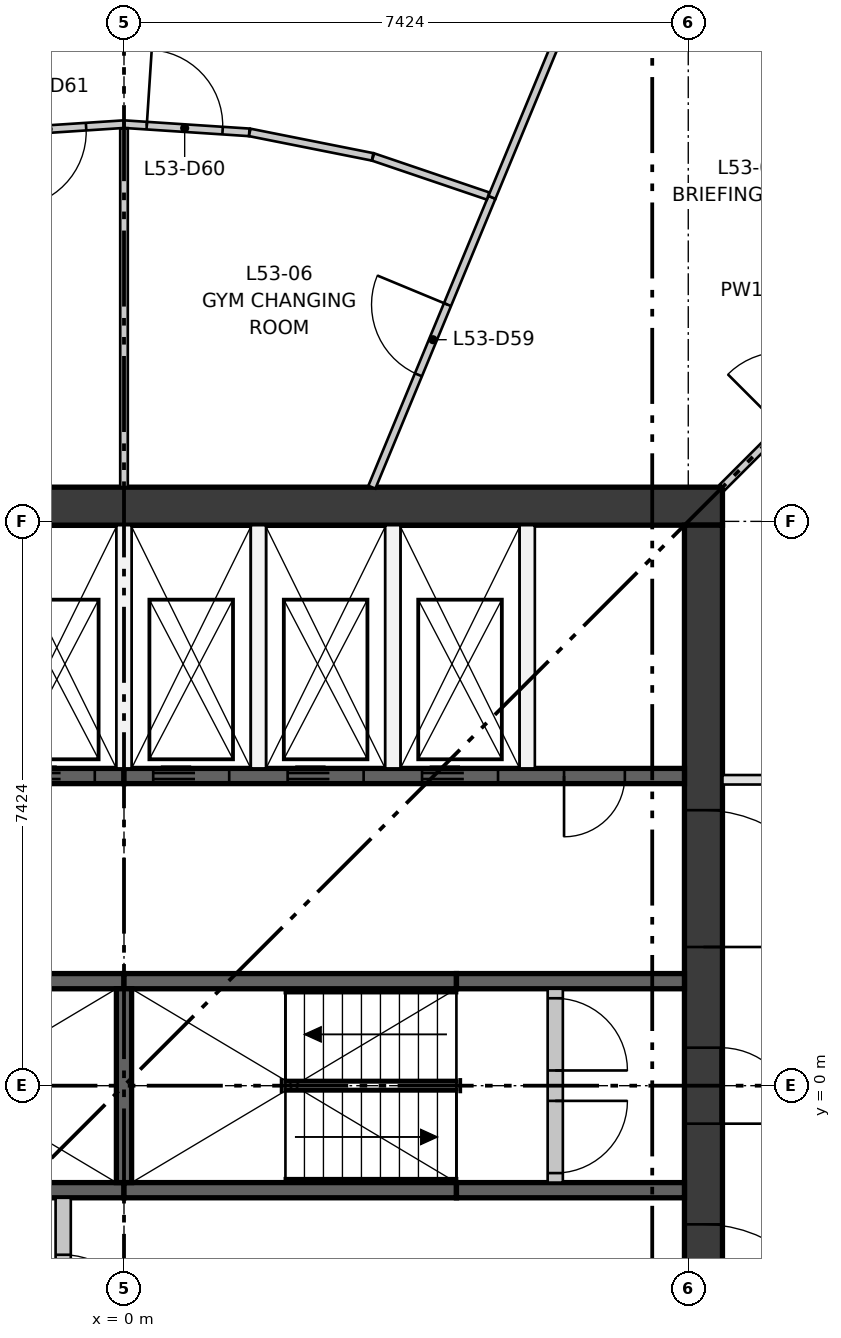
"""IFC4 building model, lengths in metres.
Left out: names, types, materials, properties, quantities, classifications, styles, units other than length and angle.
Written with IfcOpenShell. Run it as: python <this file> out.ifc"""

import sys

from ifc_helpers import new_model, si_unit, direction, frame, frame_2d, origin, place, context, subcontext, project, spatial, rectangle, extrude, element, fill, save


model = new_model("IFC4")
c1 = context("Model", 3, precision=1e-05, world=origin(), true_north=direction((0.0, 1.0)))
c2 = subcontext(c1, "Body", "Model", "MODEL_VIEW")
j1 = project(units=[si_unit("LENGTHUNIT", "METRE"), si_unit("PLANEANGLEUNIT", "RADIAN")], contexts=[c1])
p1 = place(None, origin())
s1 = spatial("IfcSite", under=j1, at=p1, CompositionType="ELEMENT")
p2 = place(p1, origin())
s2 = spatial("IfcBuilding", under=s1, at=p2, CompositionType="ELEMENT")
p3 = place(p2, frame((0.0, 0.0, 197.7)))
s3 = spatial("IfcBuildingStorey", under=s2, at=p3, CompositionType="ELEMENT", Elevation=197.7)
p4 = place(p3, frame((-7.874, 7.624, 0.0), z_axis=(0.0, 0.0, 1.0), x_axis=(1.0, 0.0, 0.0)))
e1 = element("IfcWall", 1, at=p4, inside=s3, PredefinedType="SHEAR", context=c2, shape_type="SweptSolid", body=[
    extrude(rectangle(XDim=15.748, YDim=0.5, at=frame_2d((7.874, 0.0))), origin(), (0.0, 0.0, 1.0), 3.35),
])
p5 = place(p3, frame((7.624, -7.374, 0.0), z_axis=(0.0, 0.0, 1.0), x_axis=(0.0, 1.0, 0.0)))
e2 = element("IfcWall", 2, at=p5, inside=s3, PredefinedType="SHEAR", context=c2, shape_type="SweptSolid", body=[
    extrude(rectangle(XDim=14.748, YDim=0.5, at=frame_2d((7.374, 0.0))), origin(), (0.0, 0.0, 1.0), 3.35),
])
p6 = place(p5, frame((6.874, 0.0, 0.0)))
e3 = element("IfcOpeningElement", 3, at=p6, cuts=e2, PredefinedType="OPENING", context=c2, shape_type="SweptSolid", body=[
    extrude(rectangle(XDim=1.0, YDim=2.1, at=frame_2d((0.5, 1.05))), frame((0.0, 0.26, 0.0), z_axis=(0.0, -1.0, 0.0), x_axis=(1.0, 0.0, 0.0)), (0.0, 0.0, 1.0), 0.52),
])
p7 = place(p5, frame((3.75, 0.0, 0.0)))
e4 = element("IfcOpeningElement", 4, at=p7, cuts=e2, PredefinedType="OPENING", context=c2, shape_type="SweptSolid", body=[
    extrude(rectangle(XDim=1.8, YDim=2.1, at=frame_2d((0.9, 1.05))), frame((0.0, 0.26, 0.0), z_axis=(0.0, -1.0, 0.0), x_axis=(1.0, 0.0, 0.0)), (0.0, 0.0, 1.0), 0.52),
])
p8 = place(p5, frame((9.198, 0.0, 0.0)))
e5 = element("IfcOpeningElement", 5, at=p8, cuts=e2, PredefinedType="OPENING", context=c2, shape_type="SweptSolid", body=[
    extrude(rectangle(XDim=1.8, YDim=2.1, at=frame_2d((0.9, 1.05))), frame((0.0, 0.26, 0.0), z_axis=(0.0, -1.0, 0.0), x_axis=(1.0, 0.0, 0.0)), (0.0, 0.0, 1.0), 0.52),
])
p9 = place(p3, frame((-7.374, 4.074, 0.0), z_axis=(0.0, 0.0, 1.0), x_axis=(1.0, 0.0, 0.0)))
e6 = element("IfcWall", 6, at=p9, inside=s3, PredefinedType="SHEAR", context=c2, shape_type="SweptSolid", body=[
    extrude(rectangle(XDim=7.374, YDim=0.2, at=frame_2d((3.687, 0.0))), origin(), (0.0, 0.0, 1.0), 3.0),
])
p10 = place(p9, frame((0.684, 0.0, 0.0)))
e7 = element("IfcOpeningElement", 7, at=p10, cuts=e6, PredefinedType="OPENING", context=c2, shape_type="SweptSolid", body=[
    extrude(rectangle(XDim=1.0, YDim=2.1, at=frame_2d((0.5, 1.05))), frame((0.0, 0.11, 0.0), z_axis=(0.0, -1.0, 0.0), x_axis=(1.0, 0.0, 0.0)), (0.0, 0.0, 1.0), 0.22),
])
p11 = place(p9, frame((2.453, 0.0, 0.0)))
e8 = element("IfcOpeningElement", 8, at=p11, cuts=e6, PredefinedType="OPENING", context=c2, shape_type="SweptSolid", body=[
    extrude(rectangle(XDim=1.0, YDim=2.1, at=frame_2d((0.5, 1.05))), frame((0.0, 0.11, 0.0), z_axis=(0.0, -1.0, 0.0), x_axis=(1.0, 0.0, 0.0)), (0.0, 0.0, 1.0), 0.22),
])
p12 = place(p9, frame((4.221, 0.0, 0.0)))
e9 = element("IfcOpeningElement", 9, at=p12, cuts=e6, PredefinedType="OPENING", context=c2, shape_type="SweptSolid", body=[
    extrude(rectangle(XDim=1.0, YDim=2.1, at=frame_2d((0.5, 1.05))), frame((0.0, 0.11, 0.0), z_axis=(0.0, -1.0, 0.0), x_axis=(1.0, 0.0, 0.0)), (0.0, 0.0, 1.0), 0.22),
])
p13 = place(p9, frame((5.99, 0.0, 0.0)))
e10 = element("IfcOpeningElement", 10, at=p13, cuts=e6, PredefinedType="OPENING", context=c2, shape_type="SweptSolid", body=[
    extrude(rectangle(XDim=1.0, YDim=2.1, at=frame_2d((0.5, 1.05))), frame((0.0, 0.11, 0.0), z_axis=(0.0, -1.0, 0.0), x_axis=(1.0, 0.0, 0.0)), (0.0, 0.0, 1.0), 0.22),
])
p14 = place(p3, frame((0.0, 4.074, 0.0), z_axis=(0.0, 0.0, 1.0), x_axis=(1.0, 0.0, 0.0)))
e11 = element("IfcWall", 11, at=p14, inside=s3, PredefinedType="SHEAR", context=c2, shape_type="SweptSolid", body=[
    extrude(rectangle(XDim=7.374, YDim=0.2, at=frame_2d((3.687, 0.0))), origin(), (0.0, 0.0, 1.0), 3.0),
])
p15 = place(p14, frame((0.384, 0.0, 0.0)))
e12 = element("IfcOpeningElement", 12, at=p15, cuts=e11, PredefinedType="OPENING", context=c2, shape_type="SweptSolid", body=[
    extrude(rectangle(XDim=1.0, YDim=2.1, at=frame_2d((0.5, 1.05))), frame((0.0, 0.11, 0.0), z_axis=(0.0, -1.0, 0.0), x_axis=(1.0, 0.0, 0.0)), (0.0, 0.0, 1.0), 0.22),
])
p16 = place(p14, frame((2.153, 0.0, 0.0)))
e13 = element("IfcOpeningElement", 13, at=p16, cuts=e11, PredefinedType="OPENING", context=c2, shape_type="SweptSolid", body=[
    extrude(rectangle(XDim=1.0, YDim=2.1, at=frame_2d((0.5, 1.05))), frame((0.0, 0.11, 0.0), z_axis=(0.0, -1.0, 0.0), x_axis=(1.0, 0.0, 0.0)), (0.0, 0.0, 1.0), 0.22),
])
p17 = place(p14, frame((3.921, 0.0, 0.0)))
e14 = element("IfcOpeningElement", 14, at=p17, cuts=e11, PredefinedType="OPENING", context=c2, shape_type="SweptSolid", body=[
    extrude(rectangle(XDim=1.0, YDim=2.1, at=frame_2d((0.5, 1.05))), frame((0.0, 0.11, 0.0), z_axis=(0.0, -1.0, 0.0), x_axis=(1.0, 0.0, 0.0)), (0.0, 0.0, 1.0), 0.22),
])
p18 = place(p14, frame((5.79, 0.0, 0.0)))
e15 = element("IfcOpeningElement", 15, at=p18, cuts=e11, PredefinedType="OPENING", context=c2, shape_type="SweptSolid", body=[
    extrude(rectangle(XDim=0.8, YDim=2.1, at=frame_2d((0.4, 1.05))), frame((0.0, 0.11, 0.0), z_axis=(0.0, -1.0, 0.0), x_axis=(1.0, 0.0, 0.0)), (0.0, 0.0, 1.0), 0.22),
])
for number, where, z_axis, x_axis in (
    (16, (-4.374, -1.375, 0.0), (0.0, 0.0, 1.0), (1.0, 0.0, 0.0)),
    (17, (0.0, -1.375, 0.0), (0.0, 0.0, 1.0), (1.0, 0.0, 0.0)),
):
    element("IfcWall", number, at=place(p3, frame(where, z_axis=z_axis, x_axis=x_axis)), inside=s3, PredefinedType="SHEAR", context=c2, shape_type="SweptSolid", body=[
        extrude(rectangle(XDim=4.374, YDim=0.2, at=frame_2d((2.187, 0.0))), origin(), (0.0, 0.0, 1.0), 3.0),
    ])
p19 = place(p3, frame((4.374, -1.375, 0.0), z_axis=(0.0, 0.0, 1.0), x_axis=(1.0, 0.0, 0.0)))
e18 = element("IfcWall", 18, at=p19, inside=s3, PredefinedType="SHEAR", context=c2, shape_type="SweptSolid", body=[
    extrude(rectangle(XDim=3.0, YDim=0.2, at=frame_2d((1.5, 0.0))), origin(), (0.0, 0.0, 1.0), 3.0),
])
for number, where, z_axis, x_axis in (
    (19, (-4.374, 1.375, 0.0), (0.0, 0.0, 1.0), (1.0, 0.0, 0.0)),
    (20, (0.0, 1.375, 0.0), (0.0, 0.0, 1.0), (1.0, 0.0, 0.0)),
):
    element("IfcWall", number, at=place(p3, frame(where, z_axis=z_axis, x_axis=x_axis)), inside=s3, PredefinedType="SHEAR", context=c2, shape_type="SweptSolid", body=[
        extrude(rectangle(XDim=4.374, YDim=0.2, at=frame_2d((2.187, 0.0))), origin(), (0.0, 0.0, 1.0), 3.0),
    ])
p20 = place(p3, frame((4.374, 1.375, 0.0), z_axis=(0.0, 0.0, 1.0), x_axis=(1.0, 0.0, 0.0)))
e21 = element("IfcWall", 21, at=p20, inside=s3, PredefinedType="SHEAR", context=c2, shape_type="SweptSolid", body=[
    extrude(rectangle(XDim=3.0, YDim=0.2, at=frame_2d((1.5, 0.0))), origin(), (0.0, 0.0, 1.0), 3.0),
])
p21 = place(p3, frame((0.0, -1.275, 0.0), z_axis=(0.0, 0.0, 1.0), x_axis=(0.0, 1.0, 0.0)))
e22 = element("IfcWall", 22, at=p21, inside=s3, PredefinedType="SHEAR", context=c2, shape_type="SweptSolid", body=[
    extrude(rectangle(XDim=2.55, YDim=0.2, at=frame_2d((1.275, 0.0))), origin(), (0.0, 0.0, 1.0), 3.0),
])
p22 = place(p3, frame((-0.8, -3.974, 0.0), z_axis=(0.0, 0.0, 1.0), x_axis=(0.0, 1.0, 0.0)))
e23 = element("IfcWall", 23, at=p22, inside=s3, PredefinedType="PARTITIONING", context=c2, shape_type="SweptSolid", body=[
    extrude(rectangle(XDim=2.499, YDim=0.2, at=frame_2d((1.25, 0.0))), origin(), (0.0, 0.0, 1.0), 3.0),
])
p23 = place(p22, frame((0.75, 0.0, 0.0)))
e24 = element("IfcOpeningElement", 24, at=p23, cuts=e23, PredefinedType="OPENING", context=c2, shape_type="SweptSolid", body=[
    extrude(rectangle(XDim=1.0, YDim=2.1, at=frame_2d((0.5, 1.05))), frame((0.0, 0.11, 0.0), z_axis=(0.0, -1.0, 0.0), x_axis=(1.0, 0.0, 0.0)), (0.0, 0.0, 1.0), 0.22),
])
for number, where, z_axis, x_axis in (
    (25, (0.0, 4.174, 0.0), (0.0, 0.0, 1.0), (0.0, 1.0, 0.0)),
    (26, (1.769, 4.174, 0.0), (0.0, 0.0, 1.0), (0.0, 1.0, 0.0)),
    (27, (3.537, 4.174, 0.0), (0.0, 0.0, 1.0), (0.0, 1.0, 0.0)),
    (28, (5.305, 4.174, 0.0), (0.0, 0.0, 1.0), (0.0, 1.0, 0.0)),
):
    element("IfcWall", number, at=place(p3, frame(where, z_axis=z_axis, x_axis=x_axis)), inside=s3, PredefinedType="PARTITIONING", context=c2, shape_type="SweptSolid", body=[
        extrude(rectangle(XDim=3.2, YDim=0.2, at=frame_2d((1.6, 0.0))), origin(), (0.0, 0.0, 1.0), 3.0),
    ])
p24 = place(p3, frame((5.674, -1.275, 0.0), z_axis=(0.0, 0.0, 1.0), x_axis=(0.0, 1.0, 0.0)))
e29 = element("IfcWall", 29, at=p24, inside=s3, PredefinedType="PARTITIONING", context=c2, shape_type="SweptSolid", body=[
    extrude(rectangle(XDim=2.55, YDim=0.2, at=frame_2d((1.275, 0.0))), origin(), (0.0, 0.0, 1.0), 3.0),
])
p25 = place(p24, frame((0.125, 0.0, 0.0)))
e30 = element("IfcOpeningElement", 30, at=p25, cuts=e29, PredefinedType="OPENING", context=c2, shape_type="SweptSolid", body=[
    extrude(rectangle(XDim=0.95, YDim=2.1, at=frame_2d((0.475, 1.05))), frame((0.0, 0.11, 0.0), z_axis=(0.0, -1.0, 0.0), x_axis=(1.0, 0.0, 0.0)), (0.0, 0.0, 1.0), 0.22),
])
p26 = place(p24, frame((1.475, 0.0, 0.0)))
e31 = element("IfcOpeningElement", 31, at=p26, cuts=e29, PredefinedType="OPENING", context=c2, shape_type="SweptSolid", body=[
    extrude(rectangle(XDim=0.95, YDim=2.1, at=frame_2d((0.475, 1.05))), frame((0.0, 0.11, 0.0), z_axis=(0.0, -1.0, 0.0), x_axis=(1.0, 0.0, 0.0)), (0.0, 0.0, 1.0), 0.22),
])
p27 = place(p3, frame((7.874, 4.024, 0.0), z_axis=(0.0, 0.0, 1.0), x_axis=(1.0, 0.0, 0.0)))
e32 = element("IfcWall", 32, at=p27, inside=s3, PredefinedType="PARTITIONING", context=c2, shape_type="SweptSolid", body=[
    extrude(rectangle(XDim=4.53, YDim=0.125, at=frame_2d((2.265, 0.0))), origin(), (0.0, 0.0, 1.0), 3.0),
])
p28 = place(p27, frame((1.8, 0.0, 0.0)))
e33 = element("IfcOpeningElement", 33, at=p28, cuts=e32, PredefinedType="OPENING", context=c2, shape_type="SweptSolid", body=[
    extrude(rectangle(XDim=1.0, YDim=2.1, at=frame_2d((0.5, 1.05))), frame((0.0, 0.073, 0.0), z_axis=(0.0, -1.0, 0.0), x_axis=(1.0, 0.0, 0.0)), (0.0, 0.0, 1.0), 0.145),
])
p29 = place(p3, frame((7.874, 7.874, 0.0), z_axis=(0.0, 0.0, 1.0), x_axis=(0.707106781187, 0.707106781187, 0.0)))
e34 = element("IfcWall", 34, at=p29, inside=s3, PredefinedType="PARTITIONING", context=c2, shape_type="SweptSolid", body=[
    extrude(rectangle(XDim=5.084, YDim=0.1, at=frame_2d((2.542, 0.0))), origin(), (0.0, 0.0, 1.0), 3.0),
])
p30 = place(p29, frame((1.1, 0.0, 0.0)))
e35 = element("IfcOpeningElement", 35, at=p30, cuts=e34, PredefinedType="OPENING", context=c2, shape_type="SweptSolid", body=[
    extrude(rectangle(XDim=1.0, YDim=2.1, at=frame_2d((0.5, 1.05))), frame((0.0, 0.06, 0.0), z_axis=(0.0, -1.0, 0.0), x_axis=(1.0, 0.0, 0.0)), (0.0, 0.0, 1.0), 0.12),
])
p31 = place(p3, frame((3.261, 7.874, 0.0), z_axis=(0.0, 0.0, 1.0), x_axis=(0.382673969281, 0.923883452192, 0.0)))
e36 = element("IfcWall", 36, at=p31, inside=s3, PredefinedType="PARTITIONING", context=c2, shape_type="SweptSolid", body=[
    extrude(rectangle(XDim=4.127, YDim=0.1, at=frame_2d((2.063, 0.0))), origin(), (0.0, 0.0, 1.0), 3.0),
])
p32 = place(p31, frame((1.6, 0.0, 0.0)))
e37 = element("IfcOpeningElement", 37, at=p32, cuts=e36, PredefinedType="OPENING", context=c2, shape_type="SweptSolid", body=[
    extrude(rectangle(XDim=1.0, YDim=2.1, at=frame_2d((0.5, 1.05))), frame((0.0, 0.06, 0.0), z_axis=(0.0, -1.0, 0.0), x_axis=(1.0, 0.0, 0.0)), (0.0, 0.0, 1.0), 0.12),
])
p33 = place(p3, frame((4.841, 11.687, 0.0), z_axis=(0.0, 0.0, 1.0), x_axis=(0.382681959822, 0.923880142457, 0.0)))
e38 = element("IfcWall", 38, at=p33, inside=s3, PredefinedType="PARTITIONING", context=c2, shape_type="SweptSolid", body=[
    extrude(rectangle(XDim=3.57, YDim=0.1, at=frame_2d((1.785, 0.0))), origin(), (0.0, 0.0, 1.0), 3.0),
])
p34 = place(p3, frame((0.0, 12.65, 0.0), z_axis=(0.0, 0.0, 1.0), x_axis=(0.997862957787, -0.065341544791, 0.0)))
e39 = element("IfcWall", 39, at=p34, inside=s3, PredefinedType="PARTITIONING", context=c2, shape_type="SweptSolid", body=[
    extrude(rectangle(XDim=1.651, YDim=0.1, at=frame_2d((0.826, 0.0))), origin(), (0.0, 0.0, 1.0), 3.0),
])
p35 = place(p34, frame((0.3, 0.0, 0.0)))
e40 = element("IfcOpeningElement", 40, at=p35, cuts=e39, PredefinedType="OPENING", context=c2, shape_type="SweptSolid", body=[
    extrude(rectangle(XDim=1.0, YDim=2.1, at=frame_2d((0.5, 1.05))), frame((0.0, 0.06, 0.0), z_axis=(0.0, -1.0, 0.0), x_axis=(1.0, 0.0, 0.0)), (0.0, 0.0, 1.0), 0.12),
])
p36 = place(p3, frame((1.654, 12.541, 0.0), z_axis=(0.0, 0.0, 1.0), x_axis=(0.98076253728, -0.195204624605, 0.0)))
e41 = element("IfcWall", 41, at=p36, inside=s3, PredefinedType="PARTITIONING", context=c2, shape_type="SweptSolid", body=[
    extrude(rectangle(XDim=1.648, YDim=0.1, at=frame_2d((0.824, 0.0))), origin(), (0.0, 0.0, 1.0), 3.0),
])
p37 = place(p3, frame((3.277, 12.218, 0.0), z_axis=(0.0, 0.0, 1.0), x_axis=(0.946927222845, -0.321448027891, 0.0)))
e42 = element("IfcWall", 42, at=p37, inside=s3, PredefinedType="PARTITIONING", context=c2, shape_type="SweptSolid", body=[
    extrude(rectangle(XDim=1.598, YDim=0.1, at=frame_2d((0.799, 0.0))), origin(), (0.0, 0.0, 1.0), 3.0),
])
p38 = place(p3, frame((0.0, 7.874, 0.0), z_axis=(0.0, 0.0, 1.0), x_axis=(0.0, 1.0, 0.0)))
e43 = element("IfcWall", 43, at=p38, inside=s3, PredefinedType="PARTITIONING", context=c2, shape_type="SweptSolid", body=[
    extrude(rectangle(XDim=4.723, YDim=0.1, at=frame_2d((2.361, 0.0))), origin(), (0.0, 0.0, 1.0), 3.0),
])
p39 = place(p3, frame((0.0, 12.65, 0.0), z_axis=(0.0, 0.0, 1.0), x_axis=(-0.997862957787, -0.065341544791, 0.0)))
e44 = element("IfcWall", 44, at=p39, inside=s3, PredefinedType="PARTITIONING", context=c2, shape_type="SweptSolid", body=[
    extrude(rectangle(XDim=1.651, YDim=0.1, at=frame_2d((0.826, 0.0))), origin(), (0.0, 0.0, 1.0), 3.0),
])
p40 = place(p39, frame((0.5, 0.0, 0.0)))
e45 = element("IfcOpeningElement", 45, at=p40, cuts=e44, PredefinedType="OPENING", context=c2, shape_type="SweptSolid", body=[
    extrude(rectangle(XDim=1.0, YDim=2.1, at=frame_2d((0.5, 1.05))), frame((0.0, 0.06, 0.0), z_axis=(0.0, -1.0, 0.0), x_axis=(1.0, 0.0, 0.0)), (0.0, 0.0, 1.0), 0.12),
])
p41 = place(p13, frame((1.0, 0.0, 0.0), z_axis=(0.0, 0.0, 1.0), x_axis=(-1.0, 0.0, 0.0)))
e46 = element("IfcDoor", 46, at=p41, inside=s3, OperationType="DOUBLE_DOOR_SLIDING", PredefinedType="DOOR", context=c2, shape_type="SweptSolid", body=[
    extrude(rectangle(XDim=1.0, YDim=2.1, at=frame_2d((0.5, 1.05))), frame((0.0, 0.025, 0.0), z_axis=(0.0, -1.0, 0.0), x_axis=(1.0, 0.0, 0.0)), (0.0, 0.0, 1.0), 0.05),
])
fill(e10, e46)
p42 = place(p15, frame((1.0, 0.0, 0.0), z_axis=(0.0, 0.0, 1.0), x_axis=(-1.0, 0.0, 0.0)))
e47 = element("IfcDoor", 47, at=p42, inside=s3, OperationType="DOUBLE_DOOR_SLIDING", PredefinedType="DOOR", context=c2, shape_type="SweptSolid", body=[
    extrude(rectangle(XDim=1.0, YDim=2.1, at=frame_2d((0.5, 1.05))), frame((0.0, 0.025, 0.0), z_axis=(0.0, -1.0, 0.0), x_axis=(1.0, 0.0, 0.0)), (0.0, 0.0, 1.0), 0.05),
])
fill(e12, e47)
p43 = place(p16, frame((1.0, 0.0, 0.0), z_axis=(0.0, 0.0, 1.0), x_axis=(-1.0, 0.0, 0.0)))
e48 = element("IfcDoor", 48, at=p43, inside=s3, OperationType="DOUBLE_DOOR_SLIDING", PredefinedType="DOOR", context=c2, shape_type="SweptSolid", body=[
    extrude(rectangle(XDim=1.0, YDim=2.1, at=frame_2d((0.5, 1.05))), frame((0.0, 0.025, 0.0), z_axis=(0.0, -1.0, 0.0), x_axis=(1.0, 0.0, 0.0)), (0.0, 0.0, 1.0), 0.05),
])
fill(e13, e48)
p44 = place(p17, frame((1.0, 0.0, 0.0), z_axis=(0.0, 0.0, 1.0), x_axis=(-1.0, 0.0, 0.0)))
e49 = element("IfcDoor", 49, at=p44, inside=s3, OperationType="DOUBLE_DOOR_SLIDING", PredefinedType="DOOR", context=c2, shape_type="SweptSolid", body=[
    extrude(rectangle(XDim=1.0, YDim=2.1, at=frame_2d((0.5, 1.05))), frame((0.0, 0.025, 0.0), z_axis=(0.0, -1.0, 0.0), x_axis=(1.0, 0.0, 0.0)), (0.0, 0.0, 1.0), 0.05),
])
fill(e14, e49)
p45 = place(p25, frame((0.95, 0.0, 0.0), z_axis=(0.0, 0.0, 1.0), x_axis=(-1.0, 0.0, 0.0)))
e50 = element("IfcDoor", 50, at=p45, inside=s3, OperationType="SINGLE_SWING_RIGHT", PredefinedType="DOOR", context=c2, shape_type="SweptSolid", body=[
    extrude(rectangle(XDim=0.95, YDim=2.1, at=frame_2d((0.475, 1.05))), frame((0.0, 0.025, 0.0), z_axis=(0.0, -1.0, 0.0), x_axis=(1.0, 0.0, 0.0)), (0.0, 0.0, 1.0), 0.05),
])
fill(e30, e50)
p46 = place(p26, frame((0.95, 0.0, 0.0), z_axis=(0.0, 0.0, 1.0), x_axis=(-1.0, 0.0, 0.0)))
e51 = element("IfcDoor", 51, at=p46, inside=s3, OperationType="SINGLE_SWING_LEFT", PredefinedType="DOOR", context=c2, shape_type="SweptSolid", body=[
    extrude(rectangle(XDim=0.95, YDim=2.1, at=frame_2d((0.475, 1.05))), frame((0.0, 0.025, 0.0), z_axis=(0.0, -1.0, 0.0), x_axis=(1.0, 0.0, 0.0)), (0.0, 0.0, 1.0), 0.05),
])
fill(e31, e51)
p47 = place(p23, frame((1.0, 0.0, 0.0), z_axis=(0.0, 0.0, 1.0), x_axis=(-1.0, 0.0, 0.0)))
e52 = element("IfcDoor", 52, at=p47, inside=s3, OperationType="SINGLE_SWING_LEFT", PredefinedType="DOOR", context=c2, shape_type="SweptSolid", body=[
    extrude(rectangle(XDim=1.0, YDim=2.1, at=frame_2d((0.5, 1.05))), frame((0.0, 0.025, 0.0), z_axis=(0.0, -1.0, 0.0), x_axis=(1.0, 0.0, 0.0)), (0.0, 0.0, 1.0), 0.05),
])
fill(e24, e52)
p48 = place(p18, frame((0.8, 0.0, 0.0), z_axis=(0.0, 0.0, 1.0), x_axis=(-1.0, 0.0, 0.0)))
e53 = element("IfcDoor", 53, at=p48, inside=s3, OperationType="SINGLE_SWING_LEFT", PredefinedType="DOOR", context=c2, shape_type="SweptSolid", body=[
    extrude(rectangle(XDim=0.8, YDim=2.1, at=frame_2d((0.4, 1.05))), frame((0.0, 0.025, 0.0), z_axis=(0.0, -1.0, 0.0), x_axis=(1.0, 0.0, 0.0)), (0.0, 0.0, 1.0), 0.05),
])
fill(e15, e53)
p49 = place(p6, frame((1.0, 0.0, 0.0), z_axis=(0.0, 0.0, 1.0), x_axis=(-1.0, 0.0, 0.0)))
e54 = element("IfcDoor", 54, at=p49, inside=s3, OperationType="SINGLE_SWING_LEFT", PredefinedType="DOOR", context=c2, shape_type="SweptSolid", body=[
    extrude(rectangle(XDim=1.0, YDim=2.1, at=frame_2d((0.5, 1.05))), frame((0.0, 0.25, 0.0), z_axis=(0.0, -1.0, 0.0), x_axis=(1.0, 0.0, 0.0)), (0.0, 0.0, 1.0), 0.05),
])
fill(e3, e54)
p50 = place(p7, frame((1.8, 0.0, 0.0), z_axis=(0.0, 0.0, 1.0), x_axis=(-1.0, 0.0, 0.0)))
e55 = element("IfcDoor", 55, at=p50, inside=s3, OperationType="DOUBLE_DOOR_SINGLE_SWING", PredefinedType="DOOR", context=c2, shape_type="SweptSolid", body=[
    extrude(rectangle(XDim=1.8, YDim=2.1, at=frame_2d((0.9, 1.05))), frame((0.0, 0.025, 0.0), z_axis=(0.0, -1.0, 0.0), x_axis=(1.0, 0.0, 0.0)), (0.0, 0.0, 1.0), 0.05),
])
fill(e4, e55)
p51 = place(p8, frame((1.8, 0.0, 0.0), z_axis=(0.0, 0.0, 1.0), x_axis=(-1.0, 0.0, 0.0)))
e56 = element("IfcDoor", 56, at=p51, inside=s3, OperationType="DOUBLE_DOOR_SINGLE_SWING", PredefinedType="DOOR", context=c2, shape_type="SweptSolid", body=[
    extrude(rectangle(XDim=1.8, YDim=2.1, at=frame_2d((0.9, 1.05))), frame((0.0, 0.025, 0.0), z_axis=(0.0, -1.0, 0.0), x_axis=(1.0, 0.0, 0.0)), (0.0, 0.0, 1.0), 0.05),
])
fill(e5, e56)
p52 = place(p32, origin())
e57 = element("IfcDoor", 57, at=p52, inside=s3, OperationType="SINGLE_SWING_RIGHT", PredefinedType="DOOR", context=c2, shape_type="SweptSolid", body=[
    extrude(rectangle(XDim=1.0, YDim=2.1, at=frame_2d((0.5, 1.05))), frame((0.0, 0.025, 0.0), z_axis=(0.0, -1.0, 0.0), x_axis=(1.0, 0.0, 0.0)), (0.0, 0.0, 1.0), 0.05),
])
fill(e37, e57)
p53 = place(p35, origin())
e58 = element("IfcDoor", 58, at=p53, inside=s3, OperationType="SINGLE_SWING_LEFT", PredefinedType="DOOR", context=c2, shape_type="SweptSolid", body=[
    extrude(rectangle(XDim=1.0, YDim=2.1, at=frame_2d((0.5, 1.05))), frame((0.0, 0.025, 0.0), z_axis=(0.0, -1.0, 0.0), x_axis=(1.0, 0.0, 0.0)), (0.0, 0.0, 1.0), 0.05),
])
fill(e40, e58)
p54 = place(p40, origin())
e59 = element("IfcDoor", 59, at=p54, inside=s3, OperationType="SINGLE_SWING_RIGHT", PredefinedType="DOOR", context=c2, shape_type="SweptSolid", body=[
    extrude(rectangle(XDim=1.0, YDim=2.1, at=frame_2d((0.5, 1.05))), frame((0.0, 0.025, 0.0), z_axis=(0.0, -1.0, 0.0), x_axis=(1.0, 0.0, 0.0)), (0.0, 0.0, 1.0), 0.05),
])
fill(e45, e59)
save(model, sys.argv[1])
